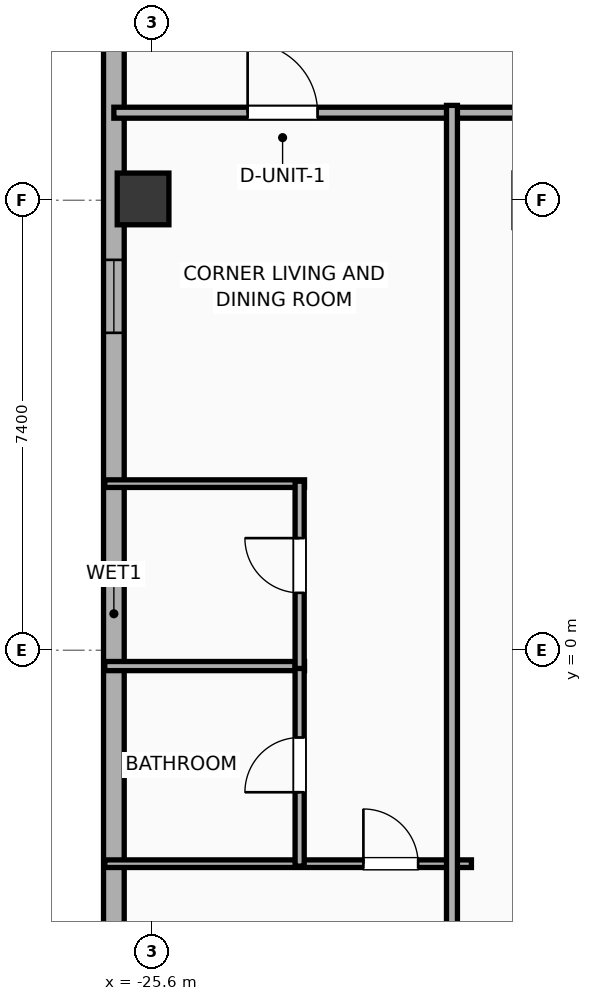
"""IFC4 building model, lengths in metres.
Left out: names, types, materials, properties, quantities, classifications, styles, units other than length and angle.
Written with IfcOpenShell. Run it as: python <this file> out.ifc"""

import sys

from ifc_helpers import new_model, si_unit, direction, frame, frame_2d, origin, origin_2d, place, context, subcontext, project, spatial, rectangle, hollow_rectangle, extrude, element, fill, save


model = new_model("IFC4")
c1 = context("Model", 3, precision=1e-05, world=origin(), true_north=direction((0.0, 1.0)))
c2 = subcontext(c1, "Body", "Model", "MODEL_VIEW")
j1 = project(units=[si_unit("LENGTHUNIT", "METRE"), si_unit("PLANEANGLEUNIT", "RADIAN")], contexts=[c1])
p1 = place(None, origin())
s1 = spatial("IfcSite", under=j1, at=p1, CompositionType="ELEMENT")
p2 = place(p1, origin())
s2 = spatial("IfcBuilding", under=s1, at=p2, CompositionType="ELEMENT")
p3 = place(p2, frame((0.0, 0.0, 250.9)))
s3 = spatial("IfcBuildingStorey", under=s2, at=p3, CompositionType="ELEMENT", Elevation=250.9)
p4 = place(p3, frame((-25.75, 7.422, 0.0), z_axis=(0.0, 0.0, 1.0), x_axis=(1.0, 0.0, 0.0)))
e1 = element("IfcColumn", 1, at=p4, inside=s3, PredefinedType="COLUMN", context=c2, shape_type="SweptSolid", body=[
    extrude(hollow_rectangle(XDim=0.85, YDim=0.85, WallThickness=0.028, at=origin_2d()), origin(), (0.0, 0.0, 1.0), 3.865),
])
p5 = place(p3, frame((-26.23, -15.383, 0.0), z_axis=(0.0, 0.0, 1.0), x_axis=(0.0, 1.0, 0.0)))
e2 = element("IfcWall", 2, at=p5, inside=s3, PredefinedType="ELEMENTEDWALL", context=c2, shape_type="SweptSolid", body=[
    extrude(rectangle(XDim=31.967, YDim=0.34, at=frame_2d((15.983, 0.0))), origin(), (0.0, 0.0, 1.0), 2.39),
])
p6 = place(p5, frame((29.431, 0.0, 0.55)))
e3 = element("IfcOpeningElement", 3, at=p6, cuts=e2, PredefinedType="OPENING", context=c2, shape_type="SweptSolid", body=[
    extrude(rectangle(XDim=1.2, YDim=1.15, at=frame_2d((0.6, 0.575))), frame((0.0, 0.18, 0.0), z_axis=(0.0, -1.0, 0.0), x_axis=(1.0, 0.0, 0.0)), (0.0, 0.0, 1.0), 0.36),
])
p7 = place(p5, frame((20.603, 0.0, 0.55)))
e4 = element("IfcOpeningElement", 4, at=p7, cuts=e2, PredefinedType="OPENING", context=c2, shape_type="SweptSolid", body=[
    extrude(rectangle(XDim=1.2, YDim=1.15, at=frame_2d((0.6, 0.575))), frame((0.0, 0.18, 0.0), z_axis=(0.0, -1.0, 0.0), x_axis=(1.0, 0.0, 0.0)), (0.0, 0.0, 1.0), 0.36),
])
p8 = place(p5, frame((7.258, 0.0, 0.55)))
e5 = element("IfcOpeningElement", 5, at=p8, cuts=e2, PredefinedType="OPENING", context=c2, shape_type="SweptSolid", body=[
    extrude(rectangle(XDim=1.2, YDim=1.15, at=frame_2d((0.6, 0.575))), frame((0.0, 0.18, 0.0), z_axis=(0.0, -1.0, 0.0), x_axis=(1.0, 0.0, 0.0)), (0.0, 0.0, 1.0), 0.36),
])
p9 = place(p3, frame((-26.23, 8.84, 0.0), z_axis=(0.0, 0.0, 1.0), x_axis=(1.0, 0.0, 0.0)))
e6 = element("IfcWall", 6, at=p9, inside=s3, PredefinedType="PARTITIONING", context=c2, shape_type="SweptSolid", body=[
    extrude(rectangle(XDim=16.35, YDim=0.18, at=frame_2d((8.175, 0.0))), origin(), (0.0, 0.0, 1.0), 2.39),
])
p10 = place(p9, frame((2.2, 0.0, 0.0)))
e7 = element("IfcOpeningElement", 7, at=p10, cuts=e6, PredefinedType="OPENING", context=c2, shape_type="SweptSolid", body=[
    extrude(rectangle(XDim=1.15, YDim=2.05, at=frame_2d((0.575, 1.025))), frame((0.0, 0.1, 0.0), z_axis=(0.0, -1.0, 0.0), x_axis=(1.0, 0.0, 0.0)), (0.0, 0.0, 1.0), 0.2),
])
p11 = place(p3, frame((-26.38, 2.74, 0.0), z_axis=(0.0, 0.0, 1.0), x_axis=(1.0, 0.0, 0.0)))
e8 = element("IfcWall", 8, at=p11, inside=s3, PredefinedType="PARTITIONING", context=c2, shape_type="SweptSolid", body=[
    extrude(rectangle(XDim=3.285, YDim=0.125, at=frame_2d((1.643, 0.0))), origin(), (0.0, 0.0, 1.0), 3.5),
])
p12 = place(p3, frame((-26.38, -0.26, 0.0), z_axis=(0.0, 0.0, 1.0), x_axis=(1.0, 0.0, 0.0)))
e9 = element("IfcWall", 9, at=p12, inside=s3, PredefinedType="PLUMBINGWALL", context=c2, shape_type="SweptSolid", body=[
    extrude(rectangle(XDim=3.285, YDim=0.15, at=frame_2d((1.643, 0.0))), origin(), (0.0, 0.0, 1.0), 3.5),
])
p13 = place(p3, frame((-26.38, -3.51, 0.0), z_axis=(0.0, 0.0, 1.0), x_axis=(1.0, 0.0, 0.0)))
e10 = element("IfcWall", 10, at=p13, inside=s3, PredefinedType="PARTITIONING", context=c2, shape_type="SweptSolid", body=[
    extrude(rectangle(XDim=6.03, YDim=0.125, at=frame_2d((3.015, 0.0))), origin(), (0.0, 0.0, 1.0), 3.5),
])
p14 = place(p13, frame((4.253, 0.0, 0.0)))
e11 = element("IfcOpeningElement", 11, at=p14, cuts=e10, PredefinedType="OPENING", context=c2, shape_type="SweptSolid", body=[
    extrude(rectangle(XDim=0.9, YDim=2.05, at=frame_2d((0.45, 1.025))), frame((0.0, 0.073, 0.0), z_axis=(0.0, -1.0, 0.0), x_axis=(1.0, 0.0, 0.0)), (0.0, 0.0, 1.0), 0.145),
])
p15 = place(p3, frame((-23.175, -3.55, 0.0), z_axis=(0.0, 0.0, 1.0), x_axis=(0.0, 1.0, 0.0)))
e12 = element("IfcWall", 12, at=p15, inside=s3, PredefinedType="PLUMBINGWALL", context=c2, shape_type="SweptSolid", body=[
    extrude(rectangle(XDim=3.33, YDim=0.15, at=frame_2d((1.665, 0.0))), origin(), (0.0, 0.0, 1.0), 3.5),
])
p16 = place(p15, frame((1.215, 0.0, 0.0)))
e13 = element("IfcOpeningElement", 13, at=p16, cuts=e12, PredefinedType="OPENING", context=c2, shape_type="SweptSolid", body=[
    extrude(rectangle(XDim=0.9, YDim=2.05, at=frame_2d((0.45, 1.025))), frame((0.0, 0.085, 0.0), z_axis=(0.0, -1.0, 0.0), x_axis=(1.0, 0.0, 0.0)), (0.0, 0.0, 1.0), 0.17),
])
p17 = place(p3, frame((-23.175, -0.3, 0.0), z_axis=(0.0, 0.0, 1.0), x_axis=(0.0, 1.0, 0.0)))
e14 = element("IfcWall", 14, at=p17, inside=s3, PredefinedType="PLUMBINGWALL", context=c2, shape_type="SweptSolid", body=[
    extrude(rectangle(XDim=3.08, YDim=0.15, at=frame_2d((1.54, 0.0))), origin(), (0.0, 0.0, 1.0), 3.5),
])
p18 = place(p17, frame((1.244, 0.0, 0.0)))
e15 = element("IfcOpeningElement", 15, at=p18, cuts=e14, PredefinedType="OPENING", context=c2, shape_type="SweptSolid", body=[
    extrude(rectangle(XDim=0.9, YDim=2.05, at=frame_2d((0.45, 1.025))), frame((0.0, 0.085, 0.0), z_axis=(0.0, -1.0, 0.0), x_axis=(1.0, 0.0, 0.0)), (0.0, 0.0, 1.0), 0.17),
])
p19 = place(p3, frame((-20.67, -8.96, 0.0), z_axis=(0.0, 0.0, 1.0), x_axis=(0.0, 1.0, 0.0)))
e16 = element("IfcWall", 16, at=p19, inside=s3, PredefinedType="PARTITIONING", context=c2, shape_type="SweptSolid", body=[
    extrude(rectangle(XDim=17.92, YDim=0.18, at=frame_2d((8.96, 0.0))), origin(), (0.0, 0.0, 1.0), 3.5),
])
p20 = place(p7, origin())
e17 = element("IfcWindow", 17, at=p20, inside=s3, PartitioningType="SINGLE_PANEL", PredefinedType="WINDOW", context=c2, shape_type="SweptSolid", body=[
    extrude(rectangle(XDim=1.2, YDim=1.15, at=frame_2d((0.6, 0.575))), frame((0.0, 0.03, 0.0), z_axis=(0.0, -1.0, 0.0), x_axis=(1.0, 0.0, 0.0)), (0.0, 0.0, 1.0), 0.06),
])
fill(e4, e17)
p21 = place(p10, origin())
e18 = element("IfcDoor", 18, at=p21, inside=s3, OperationType="SINGLE_SWING_LEFT", PredefinedType="DOOR", context=c2, shape_type="SweptSolid", body=[
    extrude(rectangle(XDim=1.15, YDim=2.05, at=frame_2d((0.575, 1.025))), frame((0.0, 0.025, 0.0), z_axis=(0.0, -1.0, 0.0), x_axis=(1.0, 0.0, 0.0)), (0.0, 0.0, 1.0), 0.05),
])
fill(e7, e18)
p22 = place(p14, origin())
e19 = element("IfcDoor", 19, at=p22, inside=s3, OperationType="SINGLE_SWING_LEFT", PredefinedType="DOOR", context=c2, shape_type="SweptSolid", body=[
    extrude(rectangle(XDim=0.9, YDim=2.05, at=frame_2d((0.45, 1.025))), frame((0.0, 0.025, 0.0), z_axis=(0.0, -1.0, 0.0), x_axis=(1.0, 0.0, 0.0)), (0.0, 0.0, 1.0), 0.05),
])
fill(e11, e19)
p23 = place(p16, origin())
e20 = element("IfcDoor", 20, at=p23, inside=s3, OperationType="SINGLE_SWING_LEFT", PredefinedType="DOOR", context=c2, shape_type="SweptSolid", body=[
    extrude(rectangle(XDim=0.9, YDim=2.05, at=frame_2d((0.45, 1.025))), frame((0.0, 0.025, 0.0), z_axis=(0.0, -1.0, 0.0), x_axis=(1.0, 0.0, 0.0)), (0.0, 0.0, 1.0), 0.05),
])
fill(e13, e20)
p24 = place(p18, origin())
e21 = element("IfcDoor", 21, at=p24, inside=s3, OperationType="SINGLE_SWING_RIGHT", PredefinedType="DOOR", context=c2, shape_type="SweptSolid", body=[
    extrude(rectangle(XDim=0.9, YDim=2.05, at=frame_2d((0.45, 1.025))), frame((0.0, 0.025, 0.0), z_axis=(0.0, -1.0, 0.0), x_axis=(1.0, 0.0, 0.0)), (0.0, 0.0, 1.0), 0.05),
])
fill(e15, e21)
save(model, sys.argv[1])
